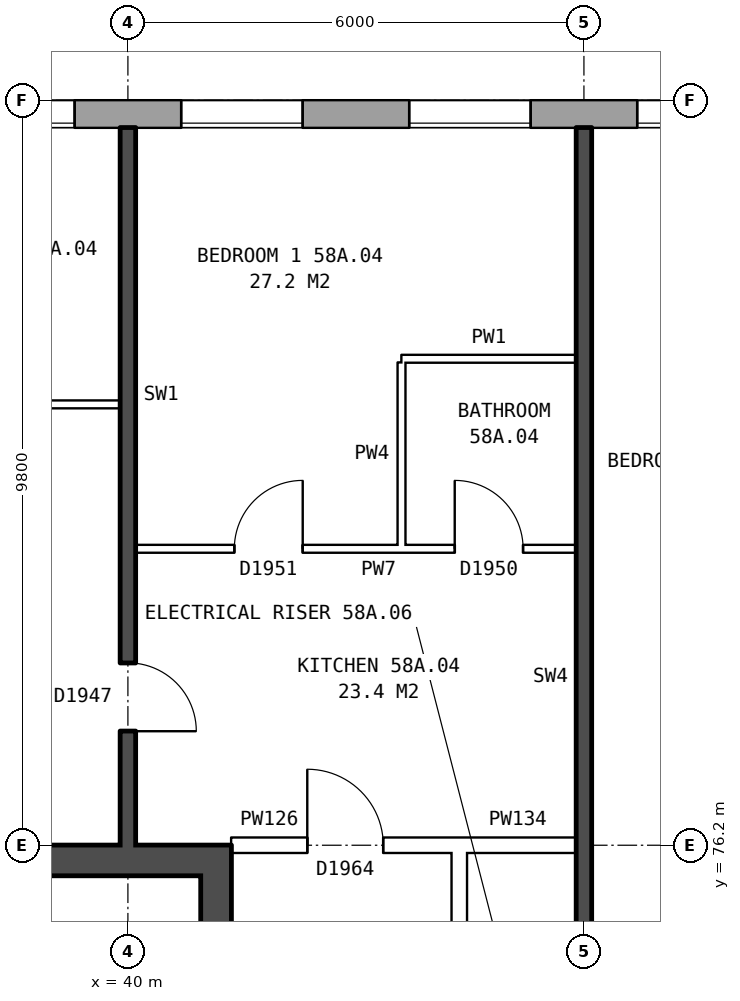
"""IFC4 building model, lengths in metres.
Left out: names, types, materials, properties, quantities, classifications, styles, units other than length and angle.
Written with IfcOpenShell. Run it as: python <this file> out.ifc"""

import sys

from ifc_helpers import new_model, si_unit, direction, frame, frame_2d, origin, place, context, subcontext, project, spatial, rectangle, extrude, element, fill, save


model = new_model("IFC4")
c1 = context("Model", 3, precision=1e-05, world=origin(), true_north=direction((0.0, 1.0)))
c2 = subcontext(c1, "Body", "Model", "MODEL_VIEW")
j1 = project(units=[si_unit("LENGTHUNIT", "METRE"), si_unit("PLANEANGLEUNIT", "RADIAN")], contexts=[c1])
p1 = place(None, origin())
s1 = spatial("IfcSite", under=j1, at=p1, CompositionType="ELEMENT")
p2 = place(p1, origin())
s2 = spatial("IfcBuilding", under=s1, at=p2, CompositionType="ELEMENT")
p3 = place(p2, frame((0.0, 0.0, 205.9)))
s3 = spatial("IfcBuildingStorey", under=s2, at=p3, CompositionType="ELEMENT", Elevation=205.9)
p4 = place(p3, frame((74.95, 85.82, 0.0), z_axis=(0.0, 0.0, 1.0), x_axis=(-1.0, 0.0, 0.0)))
e1 = element("IfcWall", 1, at=p4, inside=s3, PredefinedType="STANDARD", context=c2, shape_type="SweptSolid", body=[
    extrude(rectangle(XDim=39.875, YDim=0.36, at=frame_2d((19.938, 0.0))), origin(), (0.0, 0.0, 1.0), 2.85),
])
p5 = place(p4, frame((0.3, 0.0, 0.8)))
e2 = element("IfcOpeningElement", 2, at=p5, cuts=e1, PredefinedType="OPENING", context=c2, shape_type="SweptSolid", body=[
    extrude(rectangle(XDim=1.0, YDim=1.8, at=frame_2d((0.5, 0.9))), frame((0.0, 0.19, 0.0), z_axis=(0.0, -1.0, 0.0), x_axis=(1.0, 0.0, 0.0)), (0.0, 0.0, 1.0), 0.38),
])
p6 = place(p4, frame((5.65, 0.0, 0.8)))
e3 = element("IfcOpeningElement", 3, at=p6, cuts=e1, PredefinedType="OPENING", context=c2, shape_type="SweptSolid", body=[
    extrude(rectangle(XDim=1.6, YDim=1.8, at=frame_2d((0.8, 0.9))), frame((0.0, 0.19, 0.0), z_axis=(0.0, -1.0, 0.0), x_axis=(1.0, 0.0, 0.0)), (0.0, 0.0, 1.0), 0.38),
])
p7 = place(p4, frame((8.65, 0.0, 0.8)))
e4 = element("IfcOpeningElement", 4, at=p7, cuts=e1, PredefinedType="OPENING", context=c2, shape_type="SweptSolid", body=[
    extrude(rectangle(XDim=1.6, YDim=1.8, at=frame_2d((0.8, 0.9))), frame((0.0, 0.19, 0.0), z_axis=(0.0, -1.0, 0.0), x_axis=(1.0, 0.0, 0.0)), (0.0, 0.0, 1.0), 0.38),
])
p8 = place(p4, frame((11.65, 0.0, 0.8)))
e5 = element("IfcOpeningElement", 5, at=p8, cuts=e1, PredefinedType="OPENING", context=c2, shape_type="SweptSolid", body=[
    extrude(rectangle(XDim=1.6, YDim=1.8, at=frame_2d((0.8, 0.9))), frame((0.0, 0.19, 0.0), z_axis=(0.0, -1.0, 0.0), x_axis=(1.0, 0.0, 0.0)), (0.0, 0.0, 1.0), 0.38),
])
p9 = place(p4, frame((14.65, 0.0, 0.8)))
e6 = element("IfcOpeningElement", 6, at=p9, cuts=e1, PredefinedType="OPENING", context=c2, shape_type="SweptSolid", body=[
    extrude(rectangle(XDim=1.6, YDim=1.8, at=frame_2d((0.8, 0.9))), frame((0.0, 0.19, 0.0), z_axis=(0.0, -1.0, 0.0), x_axis=(1.0, 0.0, 0.0)), (0.0, 0.0, 1.0), 0.38),
])
p10 = place(p4, frame((17.65, 0.0, 0.8)))
e7 = element("IfcOpeningElement", 7, at=p10, cuts=e1, PredefinedType="OPENING", context=c2, shape_type="SweptSolid", body=[
    extrude(rectangle(XDim=1.6, YDim=1.8, at=frame_2d((0.8, 0.9))), frame((0.0, 0.19, 0.0), z_axis=(0.0, -1.0, 0.0), x_axis=(1.0, 0.0, 0.0)), (0.0, 0.0, 1.0), 0.38),
])
p11 = place(p4, frame((20.65, 0.0, 0.8)))
e8 = element("IfcOpeningElement", 8, at=p11, cuts=e1, PredefinedType="OPENING", context=c2, shape_type="SweptSolid", body=[
    extrude(rectangle(XDim=1.6, YDim=1.8, at=frame_2d((0.8, 0.9))), frame((0.0, 0.19, 0.0), z_axis=(0.0, -1.0, 0.0), x_axis=(1.0, 0.0, 0.0)), (0.0, 0.0, 1.0), 0.38),
])
p12 = place(p4, frame((23.65, 0.0, 0.8)))
e9 = element("IfcOpeningElement", 9, at=p12, cuts=e1, PredefinedType="OPENING", context=c2, shape_type="SweptSolid", body=[
    extrude(rectangle(XDim=1.6, YDim=1.8, at=frame_2d((0.8, 0.9))), frame((0.0, 0.19, 0.0), z_axis=(0.0, -1.0, 0.0), x_axis=(1.0, 0.0, 0.0)), (0.0, 0.0, 1.0), 0.38),
])
p13 = place(p4, frame((26.65, 0.0, 0.8)))
e10 = element("IfcOpeningElement", 10, at=p13, cuts=e1, PredefinedType="OPENING", context=c2, shape_type="SweptSolid", body=[
    extrude(rectangle(XDim=1.6, YDim=1.8, at=frame_2d((0.8, 0.9))), frame((0.0, 0.19, 0.0), z_axis=(0.0, -1.0, 0.0), x_axis=(1.0, 0.0, 0.0)), (0.0, 0.0, 1.0), 0.38),
])
p14 = place(p4, frame((29.65, 0.0, 0.8)))
e11 = element("IfcOpeningElement", 11, at=p14, cuts=e1, PredefinedType="OPENING", context=c2, shape_type="SweptSolid", body=[
    extrude(rectangle(XDim=1.6, YDim=1.8, at=frame_2d((0.8, 0.9))), frame((0.0, 0.19, 0.0), z_axis=(0.0, -1.0, 0.0), x_axis=(1.0, 0.0, 0.0)), (0.0, 0.0, 1.0), 0.38),
])
p15 = place(p4, frame((32.65, 0.0, 0.8)))
e12 = element("IfcOpeningElement", 12, at=p15, cuts=e1, PredefinedType="OPENING", context=c2, shape_type="SweptSolid", body=[
    extrude(rectangle(XDim=1.6, YDim=1.8, at=frame_2d((0.8, 0.9))), frame((0.0, 0.19, 0.0), z_axis=(0.0, -1.0, 0.0), x_axis=(1.0, 0.0, 0.0)), (0.0, 0.0, 1.0), 0.38),
])
p16 = place(p4, frame((35.65, 0.0, 0.8)))
e13 = element("IfcOpeningElement", 13, at=p16, cuts=e1, PredefinedType="OPENING", context=c2, shape_type="SweptSolid", body=[
    extrude(rectangle(XDim=1.6, YDim=1.8, at=frame_2d((0.8, 0.9))), frame((0.0, 0.19, 0.0), z_axis=(0.0, -1.0, 0.0), x_axis=(1.0, 0.0, 0.0)), (0.0, 0.0, 1.0), 0.38),
])
p17 = place(p4, frame((3.7, 0.0, 0.8)))
e14 = element("IfcOpeningElement", 14, at=p17, cuts=e1, PredefinedType="OPENING", context=c2, shape_type="SweptSolid", body=[
    extrude(rectangle(XDim=1.0, YDim=1.8, at=frame_2d((0.5, 0.9))), frame((0.0, 0.19, 0.0), z_axis=(0.0, -1.0, 0.0), x_axis=(1.0, 0.0, 0.0)), (0.0, 0.0, 1.0), 0.38),
])
p18 = place(p3, frame((41.16, 76.2, 0.0), z_axis=(0.0, 0.0, 1.0), x_axis=(0.0, -1.0, 0.0)))
e15 = element("IfcWall", 15, at=p18, inside=s3, PredefinedType="SHEAR", context=c2, shape_type="SweptSolid", body=[
    extrude(rectangle(XDim=12.4, YDim=0.4, at=frame_2d((6.2, 0.0))), origin(), (0.0, 0.0, 1.0), 2.85),
])
p19 = place(p18, frame((1.325, 0.0, 0.0)))
e16 = element("IfcOpeningElement", 16, at=p19, cuts=e15, PredefinedType="OPENING", context=c2, shape_type="SweptSolid", body=[
    extrude(rectangle(XDim=1.1, YDim=2.1, at=frame_2d((0.55, 1.05))), frame((0.0, 0.21, 0.0), z_axis=(0.0, -1.0, 0.0), x_axis=(1.0, 0.0, 0.0)), (0.0, 0.0, 1.0), 0.42),
])
p20 = place(p18, frame((4.225, 0.0, 0.0)))
e17 = element("IfcOpeningElement", 17, at=p20, cuts=e15, PredefinedType="OPENING", context=c2, shape_type="SweptSolid", body=[
    extrude(rectangle(XDim=0.85, YDim=2.1, at=frame_2d((0.425, 1.05))), frame((0.0, 0.21, 0.0), z_axis=(0.0, -1.0, 0.0), x_axis=(1.0, 0.0, 0.0)), (0.0, 0.0, 1.0), 0.42),
])
p21 = place(p18, frame((7.475, 0.0, 0.0)))
e18 = element("IfcOpeningElement", 18, at=p21, cuts=e15, PredefinedType="OPENING", context=c2, shape_type="SweptSolid", body=[
    extrude(rectangle(XDim=0.85, YDim=2.1, at=frame_2d((0.425, 1.05))), frame((0.0, 0.21, 0.0), z_axis=(0.0, -1.0, 0.0), x_axis=(1.0, 0.0, 0.0)), (0.0, 0.0, 1.0), 0.42),
])
p22 = place(p18, frame((9.9, 0.0, 0.0)))
e19 = element("IfcOpeningElement", 19, at=p22, cuts=e15, PredefinedType="OPENING", context=c2, shape_type="SweptSolid", body=[
    extrude(rectangle(XDim=1.1, YDim=2.1, at=frame_2d((0.55, 1.05))), frame((0.0, 0.21, 0.0), z_axis=(0.0, -1.0, 0.0), x_axis=(1.0, 0.0, 0.0)), (0.0, 0.0, 1.0), 0.42),
])
p23 = place(p3, frame((40.96, 76.0, 0.0), z_axis=(0.0, 0.0, 1.0), x_axis=(-1.0, 0.0, 0.0)))
e20 = element("IfcWall", 20, at=p23, inside=s3, PredefinedType="SHEAR", context=c2, shape_type="SweptSolid", body=[
    extrude(rectangle(XDim=8.2, YDim=0.4, at=frame_2d((4.1, 0.0))), origin(), (0.0, 0.0, 1.0), 2.85),
])
p24 = place(p3, frame((44.36, 63.9, 0.0), z_axis=(0.0, 0.0, 1.0), x_axis=(0.0, 1.0, 0.0)))
e21 = element("IfcWall", 21, at=p24, inside=s3, PredefinedType="PARTITIONING", context=c2, shape_type="SweptSolid", body=[
    extrude(rectangle(XDim=12.2, YDim=0.2, at=frame_2d((6.1, 0.0))), origin(), (0.0, 0.0, 1.0), 2.85),
])
p25 = place(p24, frame((5.1, 0.0, 0.0)))
e22 = element("IfcOpeningElement", 22, at=p25, cuts=e21, PredefinedType="OPENING", context=c2, shape_type="SweptSolid", body=[
    extrude(rectangle(XDim=2.0, YDim=2.1, at=frame_2d((1.0, 1.05))), frame((0.0, 0.11, 0.0), z_axis=(0.0, -1.0, 0.0), x_axis=(1.0, 0.0, 0.0)), (0.0, 0.0, 1.0), 0.22),
])
p26 = place(p3, frame((41.36, 76.2, 0.0), z_axis=(0.0, 0.0, 1.0), x_axis=(1.0, 0.0, 0.0)))
e23 = element("IfcWall", 23, at=p26, inside=s3, PredefinedType="PARTITIONING", context=c2, shape_type="SweptSolid", body=[
    extrude(rectangle(XDim=3.0, YDim=0.2, at=frame_2d((1.5, 0.0))), origin(), (0.0, 0.0, 1.0), 2.85),
])
p27 = place(p26, frame((1.0, 0.0, 0.0)))
e24 = element("IfcOpeningElement", 24, at=p27, cuts=e23, PredefinedType="OPENING", context=c2, shape_type="SweptSolid", body=[
    extrude(rectangle(XDim=1.0, YDim=2.1, at=frame_2d((0.5, 1.05))), frame((0.0, 0.11, 0.0), z_axis=(0.0, -1.0, 0.0), x_axis=(1.0, 0.0, 0.0)), (0.0, 0.0, 1.0), 0.22),
])
p28 = place(p3, frame((44.36, 76.2, 0.0), z_axis=(0.0, 0.0, 1.0), x_axis=(1.0, 0.0, 0.0)))
e25 = element("IfcWall", 25, at=p28, inside=s3, PredefinedType="PARTITIONING", context=c2, shape_type="SweptSolid", body=[
    extrude(rectangle(XDim=1.54, YDim=0.2, at=frame_2d((0.77, 0.0))), origin(), (0.0, 0.0, 1.0), 2.85),
])
p29 = place(p3, frame((40.1, 80.1, 0.0), z_axis=(0.0, 0.0, 1.0), x_axis=(1.0, 0.0, 0.0)))
e26 = element("IfcWall", 26, at=p29, inside=s3, PredefinedType="PARTITIONING", context=c2, shape_type="SweptSolid", body=[
    extrude(rectangle(XDim=5.8, YDim=0.1, at=frame_2d((2.9, 0.0))), origin(), (0.0, 0.0, 1.0), 2.85),
])
p30 = place(p29, frame((1.3, 0.0, 0.0)))
e27 = element("IfcOpeningElement", 27, at=p30, cuts=e26, PredefinedType="OPENING", context=c2, shape_type="SweptSolid", body=[
    extrude(rectangle(XDim=0.9, YDim=2.1, at=frame_2d((0.45, 1.05))), frame((0.0, 0.06, 0.0), z_axis=(0.0, -1.0, 0.0), x_axis=(1.0, 0.0, 0.0)), (0.0, 0.0, 1.0), 0.12),
])
p31 = place(p29, frame((4.2, 0.0, 0.0)))
e28 = element("IfcOpeningElement", 28, at=p31, cuts=e26, PredefinedType="OPENING", context=c2, shape_type="SweptSolid", body=[
    extrude(rectangle(XDim=0.9, YDim=2.1, at=frame_2d((0.45, 1.05))), frame((0.0, 0.06, 0.0), z_axis=(0.0, -1.0, 0.0), x_axis=(1.0, 0.0, 0.0)), (0.0, 0.0, 1.0), 0.12),
])
p32 = place(p3, frame((32.36, 82.0, 0.0), z_axis=(0.0, 0.0, 1.0), x_axis=(1.0, 0.0, 0.0)))
e29 = element("IfcWall", 29, at=p32, inside=s3, PredefinedType="PARTITIONING", context=c2, shape_type="SweptSolid", body=[
    extrude(rectangle(XDim=7.54, YDim=0.1, at=frame_2d((3.77, 0.0))), origin(), (0.0, 0.0, 1.0), 2.85),
])
p33 = place(p32, frame((3.32, 0.0, 0.0)))
e30 = element("IfcOpeningElement", 30, at=p33, cuts=e29, PredefinedType="OPENING", context=c2, shape_type="SweptSolid", body=[
    extrude(rectangle(XDim=0.9, YDim=2.1, at=frame_2d((0.45, 1.05))), frame((0.0, 0.06, 0.0), z_axis=(0.0, -1.0, 0.0), x_axis=(1.0, 0.0, 0.0)), (0.0, 0.0, 1.0), 0.12),
])
p34 = place(p3, frame((43.6, 82.6, 0.0), z_axis=(0.0, 0.0, 1.0), x_axis=(1.0, 0.0, 0.0)))
e31 = element("IfcWall", 31, at=p34, inside=s3, PredefinedType="PARTITIONING", context=c2, shape_type="SweptSolid", body=[
    extrude(rectangle(XDim=2.3, YDim=0.1, at=frame_2d((1.15, 0.0))), origin(), (0.0, 0.0, 1.0), 2.85),
])
p35 = place(p3, frame((40.0, 76.2, 0.0), z_axis=(0.0, 0.0, 1.0), x_axis=(0.0, 1.0, 0.0)))
e32 = element("IfcWall", 32, at=p35, inside=s3, PredefinedType="SOLIDWALL", context=c2, shape_type="SweptSolid", body=[
    extrude(rectangle(XDim=9.44, YDim=0.2, at=frame_2d((4.72, 0.0))), origin(), (0.0, 0.0, 1.0), 2.85),
])
p36 = place(p35, frame((1.5, 0.0, 0.0)))
e33 = element("IfcOpeningElement", 33, at=p36, cuts=e32, PredefinedType="OPENING", context=c2, shape_type="SweptSolid", body=[
    extrude(rectangle(XDim=0.9, YDim=2.1, at=frame_2d((0.45, 1.05))), frame((0.0, 0.11, 0.0), z_axis=(0.0, -1.0, 0.0), x_axis=(1.0, 0.0, 0.0)), (0.0, 0.0, 1.0), 0.22),
])
p37 = place(p3, frame((43.6, 80.15, 0.0), z_axis=(0.0, 0.0, 1.0), x_axis=(0.0, 1.0, 0.0)))
e34 = element("IfcWall", 34, at=p37, inside=s3, PredefinedType="PARTITIONING", context=c2, shape_type="SweptSolid", body=[
    extrude(rectangle(XDim=2.4, YDim=0.1, at=frame_2d((1.2, 0.0))), origin(), (0.0, 0.0, 1.0), 2.85),
])
p38 = place(p3, frame((46.0, 71.2, 0.0), z_axis=(0.0, 0.0, 1.0), x_axis=(0.0, 1.0, 0.0)))
e35 = element("IfcWall", 35, at=p38, inside=s3, PredefinedType="SOLIDWALL", context=c2, shape_type="SweptSolid", body=[
    extrude(rectangle(XDim=14.44, YDim=0.2, at=frame_2d((7.22, 0.0))), origin(), (0.0, 0.0, 1.0), 2.85),
])
p39 = place(p13, origin())
e36 = element("IfcWindow", 36, at=p39, inside=s3, PartitioningType="SINGLE_PANEL", PredefinedType="WINDOW", context=c2, shape_type="SweptSolid", body=[
    extrude(rectangle(XDim=1.6, YDim=1.8, at=frame_2d((0.8, 0.9))), frame((0.0, 0.15, 0.0), z_axis=(0.0, -1.0, 0.0), x_axis=(1.0, 0.0, 0.0)), (0.0, 0.0, 1.0), 0.06),
])
fill(e10, e36)
p40 = place(p14, origin())
e37 = element("IfcWindow", 37, at=p40, inside=s3, PartitioningType="SINGLE_PANEL", PredefinedType="WINDOW", context=c2, shape_type="SweptSolid", body=[
    extrude(rectangle(XDim=1.6, YDim=1.8, at=frame_2d((0.8, 0.9))), frame((0.0, 0.15, 0.0), z_axis=(0.0, -1.0, 0.0), x_axis=(1.0, 0.0, 0.0)), (0.0, 0.0, 1.0), 0.06),
])
fill(e11, e37)
p41 = place(p15, origin())
e38 = element("IfcWindow", 38, at=p41, inside=s3, PartitioningType="SINGLE_PANEL", PredefinedType="WINDOW", context=c2, shape_type="SweptSolid", body=[
    extrude(rectangle(XDim=1.6, YDim=1.8, at=frame_2d((0.8, 0.9))), frame((0.0, 0.15, 0.0), z_axis=(0.0, -1.0, 0.0), x_axis=(1.0, 0.0, 0.0)), (0.0, 0.0, 1.0), 0.06),
])
fill(e12, e38)
p42 = place(p16, origin())
e39 = element("IfcWindow", 39, at=p42, inside=s3, PartitioningType="SINGLE_PANEL", PredefinedType="WINDOW", context=c2, shape_type="SweptSolid", body=[
    extrude(rectangle(XDim=1.6, YDim=1.8, at=frame_2d((0.8, 0.9))), frame((0.0, 0.15, 0.0), z_axis=(0.0, -1.0, 0.0), x_axis=(1.0, 0.0, 0.0)), (0.0, 0.0, 1.0), 0.06),
])
fill(e13, e39)
p43 = place(p30, origin())
e40 = element("IfcDoor", 40, at=p43, inside=s3, OperationType="SINGLE_SWING_RIGHT", PredefinedType="DOOR", context=c2, shape_type="SweptSolid", body=[
    extrude(rectangle(XDim=0.9, YDim=2.1, at=frame_2d((0.45, 1.05))), frame((0.0, 0.025, 0.0), z_axis=(0.0, -1.0, 0.0), x_axis=(1.0, 0.0, 0.0)), (0.0, 0.0, 1.0), 0.05),
])
fill(e27, e40)
p44 = place(p27, origin())
e41 = element("IfcDoor", 41, at=p44, inside=s3, OperationType="SINGLE_SWING_LEFT", PredefinedType="DOOR", context=c2, shape_type="SweptSolid", body=[
    extrude(rectangle(XDim=1.0, YDim=2.1, at=frame_2d((0.5, 1.05))), frame((0.0, 0.025, 0.0), z_axis=(0.0, -1.0, 0.0), x_axis=(1.0, 0.0, 0.0)), (0.0, 0.0, 1.0), 0.05),
])
fill(e24, e41)
p45 = place(p36, frame((0.9, 0.0, 0.0), z_axis=(0.0, 0.0, 1.0), x_axis=(-1.0, 0.0, 0.0)))
e42 = element("IfcDoor", 42, at=p45, inside=s3, OperationType="SINGLE_SWING_RIGHT", PredefinedType="DOOR", context=c2, shape_type="SweptSolid", body=[
    extrude(rectangle(XDim=0.9, YDim=2.1, at=frame_2d((0.45, 1.05))), frame((0.0, 0.025, 0.0), z_axis=(0.0, -1.0, 0.0), x_axis=(1.0, 0.0, 0.0)), (0.0, 0.0, 1.0), 0.05),
])
fill(e33, e42)
p46 = place(p31, origin())
e43 = element("IfcDoor", 43, at=p46, inside=s3, OperationType="SINGLE_SWING_LEFT", PredefinedType="DOOR", context=c2, shape_type="SweptSolid", body=[
    extrude(rectangle(XDim=0.9, YDim=2.1, at=frame_2d((0.45, 1.05))), frame((0.0, 0.025, 0.0), z_axis=(0.0, -1.0, 0.0), x_axis=(1.0, 0.0, 0.0)), (0.0, 0.0, 1.0), 0.05),
])
fill(e28, e43)
save(model, sys.argv[1])
